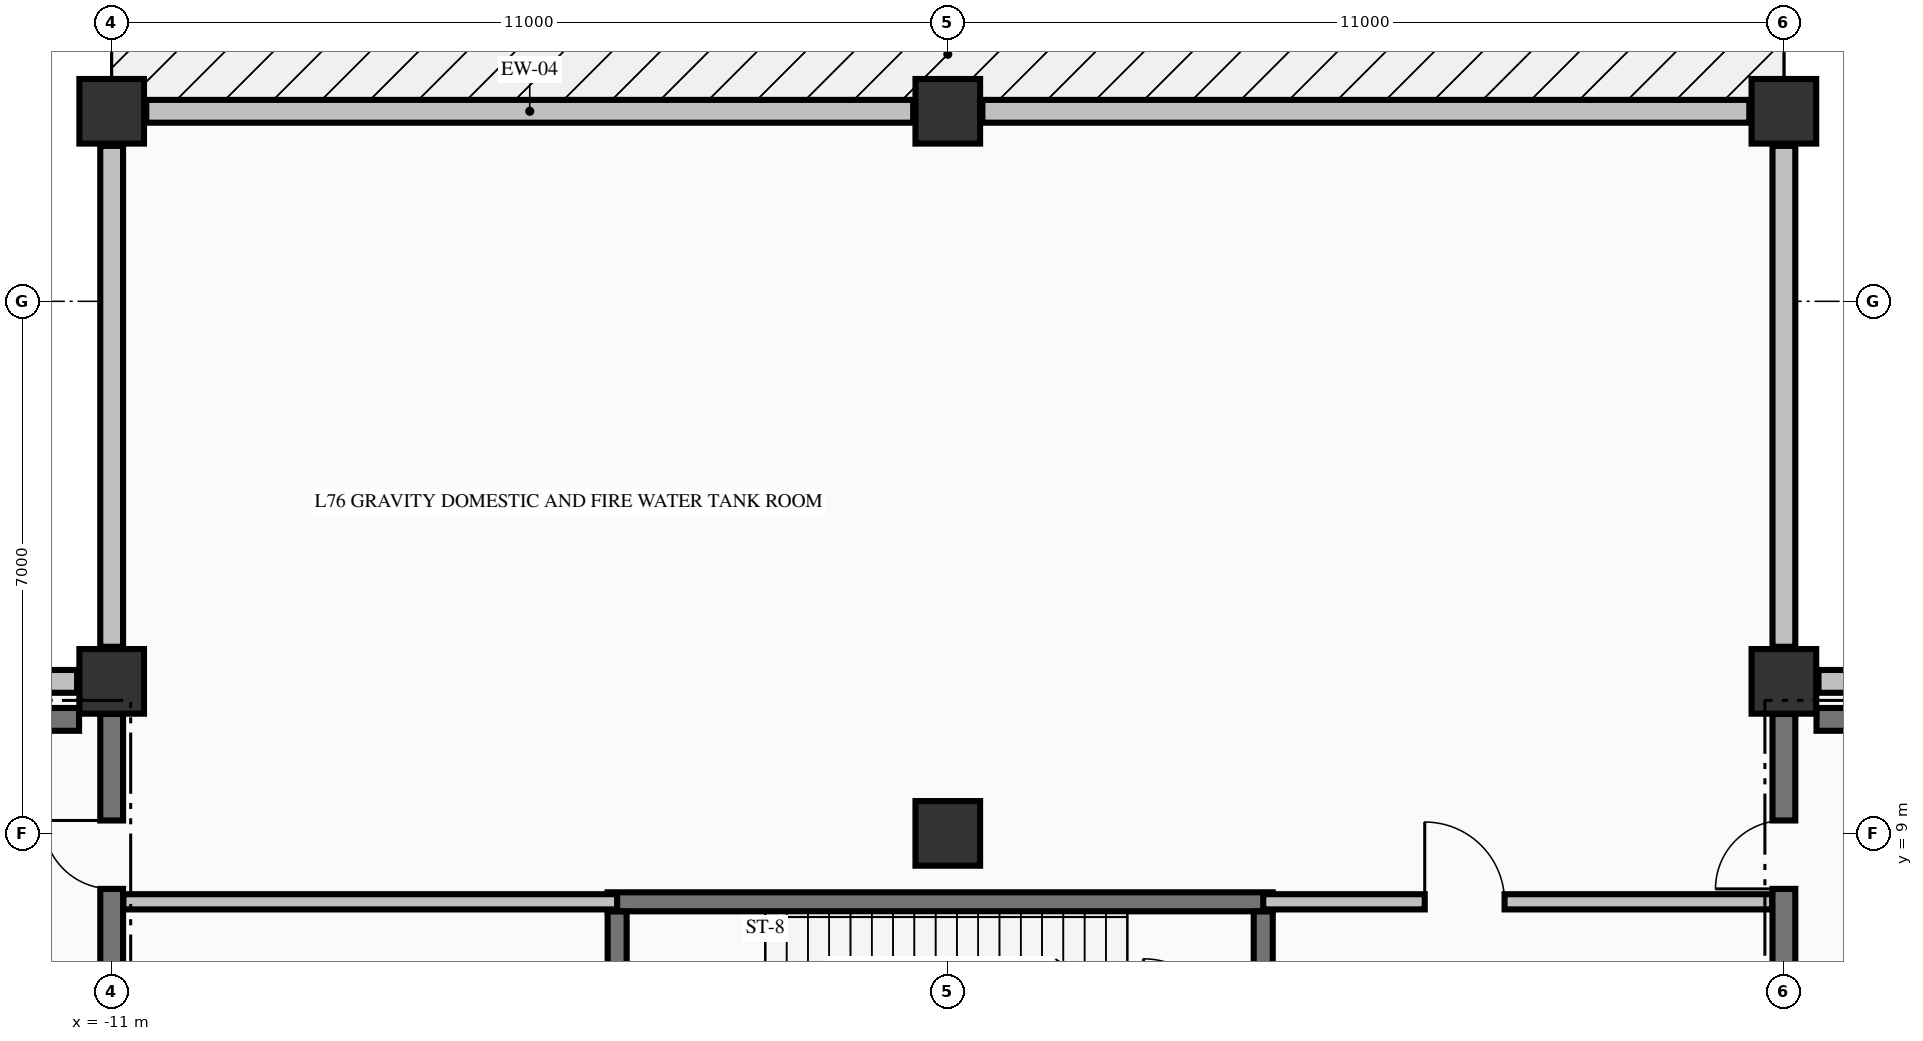
"""IFC4 building model, lengths in metres.
Left out: names, types, materials, properties, quantities, classifications, styles, units other than length and angle.
Written with IfcOpenShell. Run it as: python <this file> out.ifc"""

import sys

from ifc_helpers import new_model, si_unit, direction, frame, frame_2d, origin, origin_2d, place, context, subcontext, project, spatial, rectangle, extrude, element, fill, save


model = new_model("IFC4")
c1 = context("Model", 3, precision=1e-05, world=origin(), true_north=direction((0.0, 1.0)))
c2 = subcontext(c1, "Body", "Model", "MODEL_VIEW")
j1 = project(units=[si_unit("LENGTHUNIT", "METRE"), si_unit("PLANEANGLEUNIT", "RADIAN")], contexts=[c1])
p1 = place(None, origin())
s1 = spatial("IfcSite", under=j1, at=p1, CompositionType="ELEMENT")
p2 = place(p1, origin())
s2 = spatial("IfcBuilding", under=s1, at=p2, CompositionType="ELEMENT")
p3 = place(p2, frame((0.0, 0.0, 284.86)))
s3 = spatial("IfcBuildingStorey", under=s2, at=p3, CompositionType="ELEMENT", Elevation=284.86)
for number, where, z_axis, x_axis in (
    (1, (11.0, 18.5, -0.325), (0.0, 0.0, 1.0), (1.0, 0.0, 0.0)),
    (2, (0.0, 18.5, -0.325), (0.0, 0.0, 1.0), (1.0, 0.0, 0.0)),
    (3, (-11.0, 18.5, -0.325), (0.0, 0.0, 1.0), (1.0, 0.0, 0.0)),
    (4, (-11.0, 11.0, -0.325), (0.0, 0.0, 1.0), (1.0, 0.0, 0.0)),
    (5, (11.0, 11.0, -0.325), (0.0, 0.0, 1.0), (1.0, 0.0, 0.0)),
    (6, (0.0, 9.0, -0.325), (0.0, 0.0, 1.0), (1.0, 0.0, 0.0)),
):
    element("IfcColumn", number, at=place(p3, frame(where, z_axis=z_axis, x_axis=x_axis)), inside=s3, PredefinedType="COLUMN", context=c2, shape_type="SweptSolid", body=[
        extrude(rectangle(XDim=0.85, YDim=0.85, at=origin_2d()), origin(), (0.0, 0.0, 1.0), 3.06),
    ])
for number, where, z_axis, x_axis in (
    (7, (-0.455, 18.5, 0.0), (0.0, 0.0, 1.0), (-1.0, 0.0, 0.0)),
    (8, (10.545, 18.5, 0.0), (0.0, 0.0, 1.0), (-1.0, 0.0, 0.0)),
):
    element("IfcWall", number, at=place(p3, frame(where, z_axis=z_axis, x_axis=x_axis)), inside=s3, PredefinedType="STANDARD", context=c2, shape_type="SweptSolid", body=[
        extrude(rectangle(XDim=10.09, YDim=0.3, at=frame_2d((5.045, 0.0))), origin(), (0.0, 0.0, 1.0), 2.127),
    ])
p4 = place(p3, frame((18.045, 11.0, 0.0), z_axis=(0.0, 0.0, 1.0), x_axis=(-1.0, 0.0, 0.0)))
e9 = element("IfcWall", 9, at=p4, inside=s3, PredefinedType="STANDARD", context=c2, shape_type="SweptSolid", body=[
    extrude(rectangle(XDim=6.59, YDim=0.3, at=frame_2d((3.295, 0.0))), origin(), (0.0, 0.0, 1.0), 1.077),
])
for number, where, z_axis, x_axis in (
    (10, (11.0, 11.455, 0.0), (0.0, 0.0, 1.0), (0.0, 1.0, 0.0)),
    (11, (-11.0, 18.045, 0.0), (0.0, 0.0, 1.0), (0.0, -1.0, 0.0)),
):
    element("IfcWall", number, at=place(p3, frame(where, z_axis=z_axis, x_axis=x_axis)), inside=s3, PredefinedType="STANDARD", context=c2, shape_type="SweptSolid", body=[
        extrude(rectangle(XDim=6.59, YDim=0.3, at=frame_2d((3.295, 0.0))), origin(), (0.0, 0.0, 1.0), 0.927),
    ])
p5 = place(p3, frame((-11.455, 11.0, 0.0), z_axis=(0.0, 0.0, 1.0), x_axis=(-1.0, 0.0, 0.0)))
e12 = element("IfcWall", 12, at=p5, inside=s3, PredefinedType="STANDARD", context=c2, shape_type="SweptSolid", body=[
    extrude(rectangle(XDim=6.59, YDim=0.3, at=frame_2d((3.295, 0.0))), origin(), (0.0, 0.0, 1.0), 1.077),
])
p6 = place(p3, frame((-4.475, 8.1, 0.0), z_axis=(0.0, 0.0, 1.0), x_axis=(1.0, 0.0, 0.0)))
e13 = element("IfcWall", 13, at=p6, inside=s3, PredefinedType="SOLIDWALL", context=c2, shape_type="SweptSolid", body=[
    extrude(rectangle(XDim=8.75, YDim=0.25, at=frame_2d((4.375, 0.0))), origin(), (0.0, 0.0, 1.0), 2.735),
])
for number, where, z_axis, x_axis in (
    (14, (-14.85, 10.5, 0.0), (0.0, 0.0, 1.0), (1.0, 0.0, 0.0)),
    (15, (11.429, 10.5, 0.0), (0.0, 0.0, 1.0), (1.0, 0.0, 0.0)),
):
    element("IfcWall", number, at=place(p3, frame(where, z_axis=z_axis, x_axis=x_axis)), inside=s3, PredefinedType="SHEAR", context=c2, shape_type="SweptSolid", body=[
        extrude(rectangle(XDim=3.421, YDim=0.3, at=frame_2d((1.71, 0.0))), origin(), (0.0, 0.0, 1.0), 2.735),
    ])
p7 = place(p3, frame((-10.847, 8.1, 0.0), z_axis=(0.0, 0.0, 1.0), x_axis=(1.0, 0.0, 0.0)))
e16 = element("IfcWall", 16, at=p7, inside=s3, PredefinedType="PARTITIONING", context=c2, shape_type="SweptSolid", body=[
    extrude(rectangle(XDim=6.497, YDim=0.2, at=frame_2d((3.249, 0.0))), origin(), (0.0, 0.0, 1.0), 2.735),
])
p8 = place(p3, frame((4.15, 8.1, 0.0), z_axis=(0.0, 0.0, 1.0), x_axis=(1.0, 0.0, 0.0)))
e17 = element("IfcWall", 17, at=p8, inside=s3, PredefinedType="PARTITIONING", context=c2, shape_type="SweptSolid", body=[
    extrude(rectangle(XDim=6.697, YDim=0.2, at=frame_2d((3.349, 0.0))), origin(), (0.0, 0.0, 1.0), 2.735),
])
p9 = place(p8, frame((2.125, 0.0, 0.0)))
e18 = element("IfcOpeningElement", 18, at=p9, cuts=e17, PredefinedType="OPENING", context=c2, shape_type="SweptSolid", body=[
    extrude(rectangle(XDim=1.05, YDim=2.15, at=frame_2d((0.525, 1.075))), frame((0.0, 0.11, 0.0), z_axis=(0.0, -1.0, 0.0), x_axis=(1.0, 0.0, 0.0)), (0.0, 0.0, 1.0), 0.22),
])
p10 = place(p3, frame((-11.0, 5.852, 0.0), z_axis=(0.0, 0.0, 1.0), x_axis=(0.0, 1.0, 0.0)))
e19 = element("IfcWall", 19, at=p10, inside=s3, PredefinedType="SHEAR", context=c2, shape_type="SweptSolid", body=[
    extrude(rectangle(XDim=4.719, YDim=0.3, at=frame_2d((2.359, 0.0))), origin(), (0.0, 0.0, 1.0), 2.735),
])
p11 = place(p10, frame((2.418, 0.0, 0.0)))
e20 = element("IfcOpeningElement", 20, at=p11, cuts=e19, PredefinedType="OPENING", context=c2, shape_type="SweptSolid", body=[
    extrude(rectangle(XDim=0.9, YDim=2.15, at=frame_2d((0.45, 1.075))), frame((0.0, 0.16, 0.0), z_axis=(0.0, -1.0, 0.0), x_axis=(1.0, 0.0, 0.0)), (0.0, 0.0, 1.0), 0.32),
])
for number, where, z_axis, x_axis in (
    (21, (-4.35, 6.427, 0.0), (0.0, 0.0, 1.0), (0.0, 1.0, 0.0)),
    (22, (4.15, 6.427, 0.0), (0.0, 0.0, 1.0), (0.0, 1.0, 0.0)),
):
    element("IfcWall", number, at=place(p3, frame(where, z_axis=z_axis, x_axis=x_axis)), inside=s3, PredefinedType="SOLIDWALL", context=c2, shape_type="SweptSolid", body=[
        extrude(rectangle(XDim=1.546, YDim=0.25, at=frame_2d((0.773, 0.0))), origin(), (0.0, 0.0, 1.0), 2.735),
    ])
p12 = place(p3, frame((11.0, 5.852, 0.0), z_axis=(0.0, 0.0, 1.0), x_axis=(0.0, 1.0, 0.0)))
e23 = element("IfcWall", 23, at=p12, inside=s3, PredefinedType="SHEAR", context=c2, shape_type="SweptSolid", body=[
    extrude(rectangle(XDim=4.719, YDim=0.3, at=frame_2d((2.359, 0.0))), origin(), (0.0, 0.0, 1.0), 2.735),
])
p13 = place(p12, frame((2.418, 0.0, 0.0)))
e24 = element("IfcOpeningElement", 24, at=p13, cuts=e23, PredefinedType="OPENING", context=c2, shape_type="SweptSolid", body=[
    extrude(rectangle(XDim=0.9, YDim=2.15, at=frame_2d((0.45, 1.075))), frame((0.0, 0.16, 0.0), z_axis=(0.0, -1.0, 0.0), x_axis=(1.0, 0.0, 0.0)), (0.0, 0.0, 1.0), 0.32),
])
p14 = place(p11, origin())
e25 = element("IfcDoor", 25, at=p14, inside=s3, OperationType="SINGLE_SWING_RIGHT", PredefinedType="DOOR", context=c2, shape_type="SweptSolid", body=[
    extrude(rectangle(XDim=0.9, YDim=2.15, at=frame_2d((0.45, 1.075))), frame((0.0, 0.025, 0.0), z_axis=(0.0, -1.0, 0.0), x_axis=(1.0, 0.0, 0.0)), (0.0, 0.0, 1.0), 0.05),
])
fill(e20, e25)
p15 = place(p13, origin())
e26 = element("IfcDoor", 26, at=p15, inside=s3, OperationType="SINGLE_SWING_LEFT", PredefinedType="DOOR", context=c2, shape_type="SweptSolid", body=[
    extrude(rectangle(XDim=0.9, YDim=2.15, at=frame_2d((0.45, 1.075))), frame((0.0, 0.025, 0.0), z_axis=(0.0, -1.0, 0.0), x_axis=(1.0, 0.0, 0.0)), (0.0, 0.0, 1.0), 0.05),
])
fill(e24, e26)
p16 = place(p9, origin())
e27 = element("IfcDoor", 27, at=p16, inside=s3, OperationType="SINGLE_SWING_LEFT", PredefinedType="DOOR", context=c2, shape_type="SweptSolid", body=[
    extrude(rectangle(XDim=1.05, YDim=2.15, at=frame_2d((0.525, 1.075))), frame((0.0, 0.025, 0.0), z_axis=(0.0, -1.0, 0.0), x_axis=(1.0, 0.0, 0.0)), (0.0, 0.0, 1.0), 0.05),
])
fill(e18, e27)
save(model, sys.argv[1])
